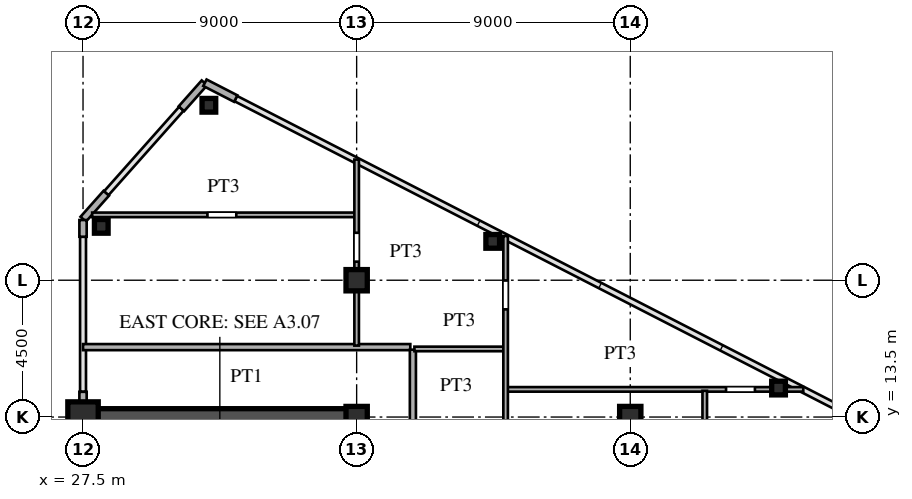
"""IFC4 building model, lengths in metres.
Left out: names, types, materials, properties, quantities, classifications, styles, units other than length and angle.
Written with IfcOpenShell. Run it as: python <this file> out.ifc"""

import sys

from ifc_helpers import new_model, si_unit, direction, frame, frame_2d, origin, origin_2d, place, context, subcontext, project, spatial, rectangle, hollow_rectangle, i_section, extrude, source, transform, mapped, element, save


model = new_model("IFC4")
c1 = context("Model", 3, precision=1e-05, world=origin(), true_north=direction((0.0, 1.0)))
c2 = subcontext(c1, "Body", "Model", "MODEL_VIEW")
j1 = project(units=[si_unit("LENGTHUNIT", "METRE"), si_unit("PLANEANGLEUNIT", "RADIAN")], contexts=[c1])
p1 = place(None, origin())
s1 = spatial("IfcSite", under=j1, at=p1, CompositionType="ELEMENT")
p2 = place(p1, origin())
s2 = spatial("IfcBuilding", under=s1, at=p2, CompositionType="ELEMENT")
p3 = place(p2, frame((0.0, 0.0, 154.8)))
s3 = spatial("IfcBuildingStorey", under=s2, at=p3, CompositionType="ELEMENT", Elevation=154.8)
m1 = source(origin(), c2, "Body", "SweptSolid", [
    extrude(hollow_rectangle(XDim=1.0, YDim=1.0, WallThickness=0.042, at=origin_2d()), origin(), (0.0, 0.0, 1.0), 3.6),
])
p4 = place(p3, frame((27.5, 13.5, 0.0), z_axis=(0.0, 0.0, 1.0), x_axis=(1.0, 0.0, 0.0)))
e1 = element("IfcColumn", 1, at=p4, inside=s3, PredefinedType="COLUMN", context=c2, shape_type="MappedRepresentation", body=[
    mapped(m1, transform((0.0, 0.0, 0.0), scale=1.0)),
])
m2 = source(origin(), c2, "Body", "SweptSolid", [
    extrude(i_section(OverallWidth=0.7, OverallDepth=0.7, WebThickness=0.028, FlangeThickness=0.045, at=origin_2d()), origin(), (0.0, 0.0, 1.0), 3.6),
])
for number, where, z_axis, x_axis in (
    (2, (36.5, 13.5, 0.0), (0.0, 0.0, 1.0), (1.0, 0.0, 0.0)),
    (3, (36.5, 18.0, 0.0), (0.0, 0.0, 1.0), (1.0, 0.0, 0.0)),
    (4, (45.5, 13.5, 0.0), (0.0, 0.0, 1.0), (1.0, 0.0, 0.0)),
):
    element("IfcColumn", number, at=place(p3, frame(where, z_axis=z_axis, x_axis=x_axis)), inside=s3, PredefinedType="COLUMN", context=c2, shape_type="MappedRepresentation", body=[
        mapped(m2, transform((0.0, 0.0, 0.0), scale=1.0)),
    ])
m3 = source(origin(), c2, "Body", "SweptSolid", [
    extrude(hollow_rectangle(XDim=0.45, YDim=0.45, WallThickness=0.018, at=origin_2d()), origin(), (0.0, 0.0, 1.0), 3.6),
])
for number, where, z_axis, x_axis in (
    (5, (31.64, 23.754, 0.0), (0.0, 0.0, 1.0), (1.0, 0.0, 0.0)),
    (6, (28.1, 19.772, 0.0), (0.0, 0.0, 1.0), (1.0, 0.0, 0.0)),
    (7, (40.976, 19.278, 0.0), (0.0, 0.0, 1.0), (1.0, 0.0, 0.0)),
    (8, (50.377, 14.453, 0.0), (0.0, 0.0, 1.0), (1.0, 0.0, 0.0)),
):
    element("IfcColumn", number, at=place(p3, frame(where, z_axis=z_axis, x_axis=x_axis)), inside=s3, PredefinedType="COLUMN", context=c2, shape_type="MappedRepresentation", body=[
        mapped(m3, transform((0.0, 0.0, 0.0), scale=1.0)),
    ])
p5 = place(p3, frame((32.523, 23.975, 0.0), z_axis=(0.0, 0.0, 1.0), x_axis=(-0.889797395748, 0.456355776255, 0.0)))
e9 = element("IfcWall", 9, at=p5, inside=s3, PredefinedType="SOLIDWALL", context=c2, shape_type="SweptSolid", body=[
    extrude(rectangle(XDim=1.14, YDim=0.24, at=frame_2d((0.57, 0.0))), origin(), (0.0, 0.0, 1.0), 3.38),
])
for number, where, z_axis, x_axis in (
    (10, (31.493, 24.492, 0.0), (0.0, 0.0, 1.0), (-0.664, -0.747, 0.0)),
    (11, (28.264, 20.86, 0.0), (0.0, 0.0, 1.0), (-0.664, -0.747, 0.0)),
):
    element("IfcWall", number, at=place(p3, frame(where, z_axis=z_axis, x_axis=x_axis)), inside=s3, PredefinedType="SOLIDWALL", context=c2, shape_type="SweptSolid", body=[
        extrude(rectangle(XDim=1.14, YDim=0.24, at=frame_2d((0.57, 0.0))), origin(), (0.0, 0.0, 1.0), 3.38),
    ])
p6 = place(p3, frame((27.5, 13.78, 0.0), z_axis=(0.0, 0.0, 1.0), x_axis=(0.0, 1.0, 0.0)))
e12 = element("IfcWall", 12, at=p6, inside=s3, PredefinedType="SOLIDWALL", context=c2, shape_type="SweptSolid", body=[
    extrude(rectangle(XDim=0.55, YDim=0.24, at=frame_2d((0.275, 0.0))), origin(), (0.0, 0.0, 1.0), 1.88),
])
p7 = place(p3, frame((27.5, 19.43, 0.0), z_axis=(0.0, 0.0, 1.0), x_axis=(0.0, 1.0, 0.0)))
e13 = element("IfcWall", 13, at=p7, inside=s3, PredefinedType="SOLIDWALL", context=c2, shape_type="SweptSolid", body=[
    extrude(rectangle(XDim=0.55, YDim=0.24, at=frame_2d((0.275, 0.0))), origin(), (0.0, 0.0, 1.0), 3.38),
])
p8 = place(p3, frame((27.5, 1.3, 0.0), z_axis=(0.0, 0.0, 1.0), x_axis=(0.0, 1.0, 0.0)))
e14 = element("IfcWall", 14, at=p8, inside=s3, PredefinedType="SHEAR", context=c2, shape_type="SweptSolid", body=[
    extrude(rectangle(XDim=12.2, YDim=0.55, at=frame_2d((6.1, 0.0))), origin(), (0.0, 0.0, 1.0), 3.38),
])
p9 = place(p3, frame((27.5, 13.5, 0.0), z_axis=(0.0, 0.0, 1.0), x_axis=(1.0, 0.0, 0.0)))
e15 = element("IfcWall", 15, at=p9, inside=s3, PredefinedType="SHEAR", context=c2, shape_type="SweptSolid", body=[
    extrude(rectangle(XDim=9.0, YDim=0.55, at=frame_2d((4.5, 0.0))), origin(), (0.0, 0.0, 1.0), 3.38),
])
p10 = place(p3, frame((36.5, 8.2, 0.0), z_axis=(0.0, 0.0, 1.0), x_axis=(0.0, 1.0, 0.0)))
e16 = element("IfcWall", 16, at=p10, inside=s3, PredefinedType="SHEAR", context=c2, shape_type="SweptSolid", body=[
    extrude(rectangle(XDim=5.45, YDim=0.55, at=frame_2d((2.725, 0.0))), origin(), (0.0, 0.0, 1.0), 3.38),
])
p11 = place(p10, frame((0.245, 0.0, 0.0)))
e17 = element("IfcOpeningElement", 17, at=p11, cuts=e16, PredefinedType="OPENING", context=c2, shape_type="SweptSolid", body=[
    extrude(rectangle(XDim=0.95, YDim=2.15, at=frame_2d((0.475, 1.075))), frame((0.0, 0.285, 0.0), z_axis=(0.0, -1.0, 0.0), x_axis=(1.0, 0.0, 0.0)), (0.0, 0.0, 1.0), 0.57),
])
p12 = place(p3, frame((41.45, 14.41, 0.0), z_axis=(0.0, 0.0, 1.0), x_axis=(1.0, 0.0, 0.0)))
e18 = element("IfcWall", 18, at=p12, inside=s3, PredefinedType="PARTITIONING", context=c2, shape_type="SweptSolid", body=[
    extrude(rectangle(XDim=9.741, YDim=0.15, at=frame_2d((4.871, 0.0))), origin(), (0.0, 0.0, 1.0), 3.38),
])
p13 = place(p12, frame((7.201, 0.0, 0.0)))
e19 = element("IfcOpeningElement", 19, at=p13, cuts=e18, PredefinedType="OPENING", context=c2, shape_type="SweptSolid", body=[
    extrude(rectangle(XDim=0.95, YDim=2.15, at=frame_2d((0.475, 1.075))), frame((0.0, 0.085, 0.0), z_axis=(0.0, -1.0, 0.0), x_axis=(1.0, 0.0, 0.0)), (0.0, 0.0, 1.0), 0.17),
])
p14 = place(p3, frame((38.4, 15.74, 0.0), z_axis=(0.0, 0.0, 1.0), x_axis=(1.0, 0.0, 0.0)))
e20 = element("IfcWall", 20, at=p14, inside=s3, PredefinedType="PARTITIONING", context=c2, shape_type="SweptSolid", body=[
    extrude(rectangle(XDim=2.95, YDim=0.15, at=frame_2d((1.475, 0.0))), origin(), (0.0, 0.0, 1.0), 3.38),
])
p15 = place(p3, frame((27.5, 15.8, 0.0), z_axis=(0.0, 0.0, 1.0), x_axis=(1.0, 0.0, 0.0)))
e21 = element("IfcWall", 21, at=p15, inside=s3, PredefinedType="PARTITIONING", context=c2, shape_type="SweptSolid", body=[
    extrude(rectangle(XDim=10.765, YDim=0.2, at=frame_2d((5.382, 0.0))), origin(), (0.0, 0.0, 1.0), 3.38),
])
p16 = place(p3, frame((27.801, 20.15, 0.0), z_axis=(0.0, 0.0, 1.0), x_axis=(1.0, 0.0, 0.0)))
e22 = element("IfcWall", 22, at=p16, inside=s3, PredefinedType="PARTITIONING", context=c2, shape_type="SweptSolid", body=[
    extrude(rectangle(XDim=8.649, YDim=0.15, at=frame_2d((4.325, 0.0))), origin(), (0.0, 0.0, 1.0), 3.38),
])
p17 = place(p16, frame((3.791, 0.0, 0.0)))
e23 = element("IfcOpeningElement", 23, at=p17, cuts=e22, PredefinedType="OPENING", context=c2, shape_type="SweptSolid", body=[
    extrude(rectangle(XDim=0.95, YDim=2.15, at=frame_2d((0.475, 1.075))), frame((0.0, 0.085, 0.0), z_axis=(0.0, -1.0, 0.0), x_axis=(1.0, 0.0, 0.0)), (0.0, 0.0, 1.0), 0.17),
])
p18 = place(p3, frame((36.5, 15.85, 0.0), z_axis=(0.0, 0.0, 1.0), x_axis=(0.0, 1.0, 0.0)))
e24 = element("IfcWall", 24, at=p18, inside=s3, PredefinedType="PARTITIONING", context=c2, shape_type="SweptSolid", body=[
    extrude(rectangle(XDim=2.17, YDim=0.15, at=frame_2d((1.085, 0.0))), origin(), (0.0, 0.0, 1.0), 1.38),
])
p19 = place(p3, frame((36.5, 18.02, 0.0), z_axis=(0.0, 0.0, 1.0), x_axis=(0.0, 1.0, 0.0)))
e25 = element("IfcWall", 25, at=p19, inside=s3, PredefinedType="PARTITIONING", context=c2, shape_type="SweptSolid", body=[
    extrude(rectangle(XDim=3.949, YDim=0.15, at=frame_2d((1.975, 0.0))), origin(), (0.0, 0.0, 1.0), 3.38),
])
p20 = place(p19, frame((0.591, 0.0, 0.0)))
e26 = element("IfcOpeningElement", 26, at=p20, cuts=e25, PredefinedType="OPENING", context=c2, shape_type="SweptSolid", body=[
    extrude(rectangle(XDim=0.95, YDim=2.15, at=frame_2d((0.475, 1.075))), frame((0.0, 0.085, 0.0), z_axis=(0.0, -1.0, 0.0), x_axis=(1.0, 0.0, 0.0)), (0.0, 0.0, 1.0), 0.17),
])
p21 = place(p3, frame((38.35, -15.715, 0.0), z_axis=(0.0, 0.0, 1.0), x_axis=(0.0, 1.0, 0.0)))
e27 = element("IfcWall", 27, at=p21, inside=s3, PredefinedType="PARTITIONING", context=c2, shape_type="SweptSolid", body=[
    extrude(rectangle(XDim=31.43, YDim=0.2, at=frame_2d((15.715, 0.0))), origin(), (0.0, 0.0, 1.0), 3.38),
])
p22 = place(p21, frame((5.192, 0.0, 0.0)))
e28 = element("IfcOpeningElement", 28, at=p22, cuts=e27, PredefinedType="OPENING", context=c2, shape_type="SweptSolid", body=[
    extrude(rectangle(XDim=1.05, YDim=2.25, at=frame_2d((0.525, 1.125))), frame((0.0, 0.11, 0.0), z_axis=(0.0, -1.0, 0.0), x_axis=(1.0, 0.0, 0.0)), (0.0, 0.0, 1.0), 0.22),
])
p23 = place(p21, frame((12.895, 0.0, 0.0)))
e29 = element("IfcOpeningElement", 29, at=p23, cuts=e27, PredefinedType="OPENING", context=c2, shape_type="SweptSolid", body=[
    extrude(rectangle(XDim=1.05, YDim=2.25, at=frame_2d((0.525, 1.125))), frame((0.0, 0.11, 0.0), z_axis=(0.0, -1.0, 0.0), x_axis=(1.0, 0.0, 0.0)), (0.0, 0.0, 1.0), 0.22),
])
p24 = place(p21, frame((20.988, 0.0, 0.0)))
e30 = element("IfcOpeningElement", 30, at=p24, cuts=e27, PredefinedType="OPENING", context=c2, shape_type="SweptSolid", body=[
    extrude(rectangle(XDim=1.05, YDim=2.25, at=frame_2d((0.525, 1.125))), frame((0.0, 0.11, 0.0), z_axis=(0.0, -1.0, 0.0), x_axis=(1.0, 0.0, 0.0)), (0.0, 0.0, 1.0), 0.22),
])
p25 = place(p3, frame((41.4, 9.595, 0.0), z_axis=(0.0, 0.0, 1.0), x_axis=(0.0, 1.0, 0.0)))
e31 = element("IfcWall", 31, at=p25, inside=s3, PredefinedType="PARTITIONING", context=c2, shape_type="SweptSolid", body=[
    extrude(rectangle(XDim=9.86, YDim=0.15, at=frame_2d((4.93, 0.0))), origin(), (0.0, 0.0, 1.0), 3.38),
])
p26 = place(p25, frame((1.909, 0.0, 0.0)))
e32 = element("IfcOpeningElement", 32, at=p26, cuts=e31, PredefinedType="OPENING", context=c2, shape_type="SweptSolid", body=[
    extrude(rectangle(XDim=0.95, YDim=2.15, at=frame_2d((0.475, 1.075))), frame((0.0, 0.085, 0.0), z_axis=(0.0, -1.0, 0.0), x_axis=(1.0, 0.0, 0.0)), (0.0, 0.0, 1.0), 0.17),
])
p27 = place(p25, frame((7.447, 0.0, 0.0)))
e33 = element("IfcOpeningElement", 33, at=p27, cuts=e31, PredefinedType="OPENING", context=c2, shape_type="SweptSolid", body=[
    extrude(rectangle(XDim=0.95, YDim=2.15, at=frame_2d((0.475, 1.075))), frame((0.0, 0.085, 0.0), z_axis=(0.0, -1.0, 0.0), x_axis=(1.0, 0.0, 0.0)), (0.0, 0.0, 1.0), 0.17),
])
p28 = place(p3, frame((47.95, -8.55, 0.0), z_axis=(0.0, 0.0, 1.0), x_axis=(0.0, 1.0, 0.0)))
e34 = element("IfcWall", 34, at=p28, inside=s3, PredefinedType="PARTITIONING", context=c2, shape_type="SweptSolid", body=[
    extrude(rectangle(XDim=22.913, YDim=0.15, at=frame_2d((11.457, 0.0))), origin(), (0.0, 0.0, 1.0), 3.38),
])
p29 = place(p28, frame((5.975, 0.0, 0.0)))
e35 = element("IfcOpeningElement", 35, at=p29, cuts=e34, PredefinedType="OPENING", context=c2, shape_type="SweptSolid", body=[
    extrude(rectangle(XDim=0.95, YDim=2.15, at=frame_2d((0.475, 1.075))), frame((0.0, 0.085, 0.0), z_axis=(0.0, -1.0, 0.0), x_axis=(1.0, 0.0, 0.0)), (0.0, 0.0, 1.0), 0.17),
])
p30 = place(p28, frame((1.642, 0.0, 0.0)))
e36 = element("IfcOpeningElement", 36, at=p30, cuts=e34, PredefinedType="OPENING", context=c2, shape_type="SweptSolid", body=[
    extrude(rectangle(XDim=0.95, YDim=2.15, at=frame_2d((0.475, 1.075))), frame((0.0, 0.085, 0.0), z_axis=(0.0, -1.0, 0.0), x_axis=(1.0, 0.0, 0.0)), (0.0, 0.0, 1.0), 0.17),
])
p31 = place(p28, frame((14.978, 0.0, 0.0)))
e37 = element("IfcOpeningElement", 37, at=p31, cuts=e34, PredefinedType="OPENING", context=c2, shape_type="SweptSolid", body=[
    extrude(rectangle(XDim=0.95, YDim=2.15, at=frame_2d((0.475, 1.075))), frame((0.0, 0.085, 0.0), z_axis=(0.0, -1.0, 0.0), x_axis=(1.0, 0.0, 0.0)), (0.0, 0.0, 1.0), 0.17),
])
save(model, sys.argv[1])
